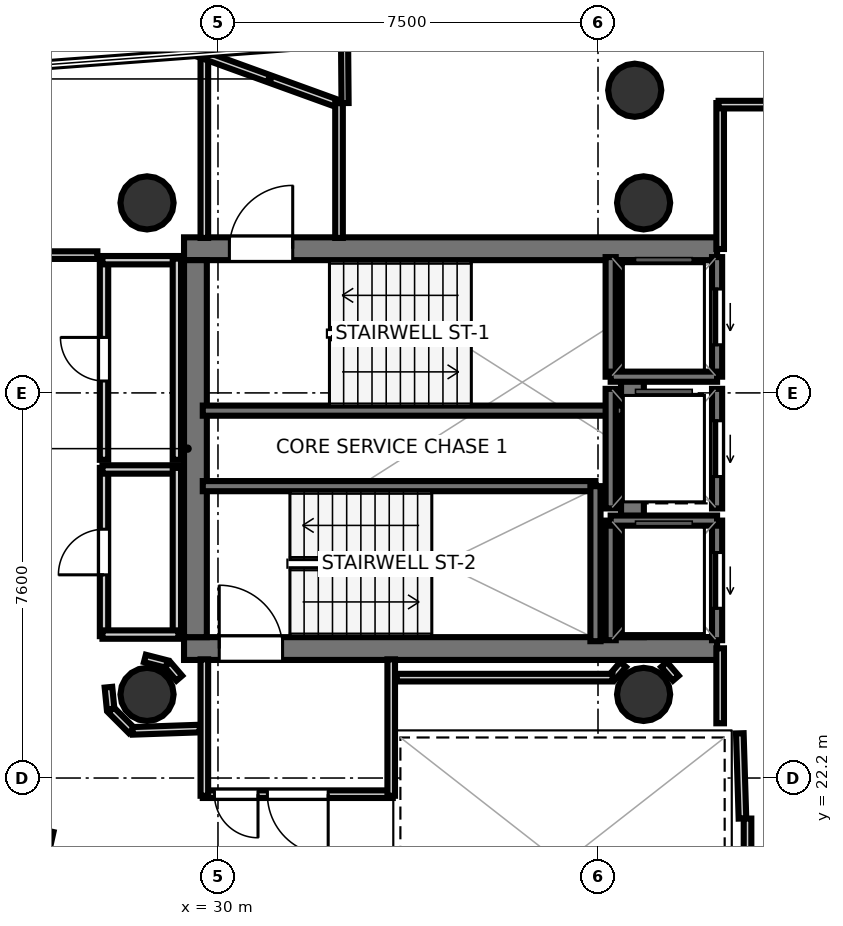
"""IFC4 building model, lengths in metres.
Left out: names, types, materials, properties, quantities, classifications, styles, units other than length and angle.
Written with IfcOpenShell. Run it as: python <this file> out.ifc"""

import sys

from ifc_helpers import new_model, si_unit, direction, frame, frame_2d, origin, origin_2d, place, context, subcontext, project, spatial, rectangle, hollow_circle, extrude, element, fill, save


model = new_model("IFC4")
c1 = context("Model", 3, precision=1e-05, world=origin(), true_north=direction((0.0, 1.0)))
c2 = subcontext(c1, "Body", "Model", "MODEL_VIEW")
j1 = project(units=[si_unit("LENGTHUNIT", "METRE"), si_unit("PLANEANGLEUNIT", "RADIAN")], contexts=[c1])
p1 = place(None, origin())
s1 = spatial("IfcSite", under=j1, at=p1, CompositionType="ELEMENT")
p2 = place(p1, origin())
s2 = spatial("IfcBuilding", under=s1, at=p2, CompositionType="ELEMENT")
p3 = place(p2, frame((0.0, 0.0, 268.6)))
s3 = spatial("IfcBuildingStorey", under=s2, at=p3, CompositionType="ELEMENT", Elevation=268.6)
p4 = place(p3, frame((29.33, 32.645, 0.0), z_axis=(0.0, 0.0, 1.0), x_axis=(1.0, 0.0, 0.0)))
e1 = element("IfcWall", 1, at=p4, inside=s3, PredefinedType="SHEAR", context=c2, shape_type="SweptSolid", body=[
    extrude(rectangle(XDim=10.52, YDim=0.45, at=frame_2d((5.26, 0.0))), origin(), (0.0, 0.0, 1.0), 3.52),
])
p5 = place(p4, frame((0.895, 0.0, 0.0)))
e2 = element("IfcOpeningElement", 2, at=p5, cuts=e1, PredefinedType="OPENING", context=c2, shape_type="SweptSolid", body=[
    extrude(rectangle(XDim=1.25, YDim=2.15, at=frame_2d((0.625, 1.075))), frame((0.0, 0.235, 0.0), z_axis=(0.0, -1.0, 0.0), x_axis=(1.0, 0.0, 0.0)), (0.0, 0.0, 1.0), 0.47),
])
p6 = place(p3, frame((29.33, 24.755, 0.0), z_axis=(0.0, 0.0, 1.0), x_axis=(1.0, 0.0, 0.0)))
e3 = element("IfcWall", 3, at=p6, inside=s3, PredefinedType="SHEAR", context=c2, shape_type="SweptSolid", body=[
    extrude(rectangle(XDim=10.52, YDim=0.45, at=frame_2d((5.26, 0.0))), origin(), (0.0, 0.0, 1.0), 3.52),
])
p7 = place(p6, frame((0.695, 0.0, 0.0)))
e4 = element("IfcOpeningElement", 4, at=p7, cuts=e3, PredefinedType="OPENING", context=c2, shape_type="SweptSolid", body=[
    extrude(rectangle(XDim=1.25, YDim=2.15, at=frame_2d((0.625, 1.075))), frame((0.0, 0.235, 0.0), z_axis=(0.0, -1.0, 0.0), x_axis=(1.0, 0.0, 0.0)), (0.0, 0.0, 1.0), 0.47),
])
for number, where, z_axis, x_axis in (
    (5, (29.555, 24.98, 0.0), (0.0, 0.0, 1.0), (0.0, 1.0, 0.0)),
    (6, (38.18, 24.98, 0.0), (0.0, 0.0, 1.0), (0.0, 1.0, 0.0)),
):
    element("IfcWall", number, at=place(p3, frame(where, z_axis=z_axis, x_axis=x_axis)), inside=s3, PredefinedType="SHEAR", context=c2, shape_type="SweptSolid", body=[
        extrude(rectangle(XDim=7.44, YDim=0.45, at=frame_2d((3.72, 0.0))), origin(), (0.0, 0.0, 1.0), 3.52),
    ])
for number, where, z_axis, x_axis in (
    (7, (28.6, 33.55, 0.0), (0.0, 0.0, 1.0), (1.0, 0.0, 0.0)),
    (8, (28.6, 23.85, 0.0), (0.0, 0.0, 1.0), (1.0, 0.0, 0.0)),
    (9, (38.4, 33.55, 0.0), (0.0, 0.0, 1.0), (1.0, 0.0, 0.0)),
    (10, (38.4, 23.85, 0.0), (0.0, 0.0, 1.0), (1.0, 0.0, 0.0)),
    (11, (38.225, 35.773, 0.0), (0.0, 0.0, 1.0), (1.0, 0.0, 0.0)),
):
    element("IfcColumn", number, at=place(p3, frame(where, z_axis=z_axis, x_axis=x_axis)), inside=s3, PredefinedType="COLUMN", context=c2, shape_type="SweptSolid", body=[
        extrude(hollow_circle(Radius=0.525, WallThickness=0.028, at=origin_2d()), origin(), (0.0, 0.0, 1.0), 3.7),
    ])
p8 = place(p3, frame((29.7, 29.45, 0.0), z_axis=(0.0, 0.0, 1.0), x_axis=(1.0, 0.0, 0.0)))
e12 = element("IfcWall", 12, at=p8, inside=s3, PredefinedType="SOLIDWALL", context=c2, shape_type="SweptSolid", body=[
    extrude(rectangle(XDim=8.3, YDim=0.2, at=frame_2d((4.15, 0.0))), origin(), (0.0, 0.0, 1.0), 3.52),
])
p9 = place(p3, frame((29.7, 27.96, 0.0), z_axis=(0.0, 0.0, 1.0), x_axis=(1.0, 0.0, 0.0)))
e13 = element("IfcWall", 13, at=p9, inside=s3, PredefinedType="SOLIDWALL", context=c2, shape_type="SweptSolid", body=[
    extrude(rectangle(XDim=7.75, YDim=0.2, at=frame_2d((3.875, 0.0))), origin(), (0.0, 0.0, 1.0), 3.52),
])
p10 = place(p3, frame((37.45, 24.9, 0.0), z_axis=(0.0, 0.0, 1.0), x_axis=(0.0, 1.0, 0.0)))
e14 = element("IfcWall", 14, at=p10, inside=s3, PredefinedType="SOLIDWALL", context=c2, shape_type="SweptSolid", body=[
    extrude(rectangle(XDim=3.06, YDim=0.2, at=frame_2d((1.53, 0.0))), origin(), (0.0, 0.0, 1.0), 3.52),
])
p11 = place(p3, frame((39.85, 30.12, 0.0), z_axis=(0.0, 0.0, 1.0), x_axis=(0.0, 1.0, 0.0)))
e15 = element("IfcWall", 15, at=p11, inside=s3, PredefinedType="SOLIDWALL", context=c2, shape_type="SweptSolid", body=[
    extrude(rectangle(XDim=2.36, YDim=0.2, at=frame_2d((1.18, 0.0))), origin(), (0.0, 0.0, 1.0), 3.52),
])
p12 = place(p11, frame((0.63, 0.0, 0.0)))
e16 = element("IfcOpeningElement", 16, at=p12, cuts=e15, PredefinedType="OPENING", context=c2, shape_type="SweptSolid", body=[
    extrude(rectangle(XDim=1.1, YDim=2.15, at=frame_2d((0.55, 1.075))), frame((0.0, 0.11, 0.0), z_axis=(0.0, -1.0, 0.0), x_axis=(1.0, 0.0, 0.0)), (0.0, 0.0, 1.0), 0.22),
])
p13 = place(p3, frame((37.75, 30.12, 0.0), z_axis=(0.0, 0.0, 1.0), x_axis=(0.0, 1.0, 0.0)))
e17 = element("IfcWall", 17, at=p13, inside=s3, PredefinedType="SOLIDWALL", context=c2, shape_type="SweptSolid", body=[
    extrude(rectangle(XDim=2.36, YDim=0.2, at=frame_2d((1.18, 0.0))), origin(), (0.0, 0.0, 1.0), 3.52),
])
p14 = place(p3, frame((37.75, 30.12, 0.0), z_axis=(0.0, 0.0, 1.0), x_axis=(1.0, 0.0, 0.0)))
e18 = element("IfcWall", 18, at=p14, inside=s3, PredefinedType="SOLIDWALL", context=c2, shape_type="SweptSolid", body=[
    extrude(rectangle(XDim=2.1, YDim=0.2, at=frame_2d((1.05, 0.0))), origin(), (0.0, 0.0, 1.0), 3.52),
])
p15 = place(p3, frame((39.85, 24.92, 0.0), z_axis=(0.0, 0.0, 1.0), x_axis=(0.0, 1.0, 0.0)))
e19 = element("IfcWall", 19, at=p15, inside=s3, PredefinedType="SOLIDWALL", context=c2, shape_type="SweptSolid", body=[
    extrude(rectangle(XDim=2.36, YDim=0.2, at=frame_2d((1.18, 0.0))), origin(), (0.0, 0.0, 1.0), 3.52),
])
p16 = place(p15, frame((0.63, 0.0, 0.0)))
e20 = element("IfcOpeningElement", 20, at=p16, cuts=e19, PredefinedType="OPENING", context=c2, shape_type="SweptSolid", body=[
    extrude(rectangle(XDim=1.1, YDim=2.15, at=frame_2d((0.55, 1.075))), frame((0.0, 0.11, 0.0), z_axis=(0.0, -1.0, 0.0), x_axis=(1.0, 0.0, 0.0)), (0.0, 0.0, 1.0), 0.22),
])
p17 = place(p3, frame((37.75, 24.92, 0.0), z_axis=(0.0, 0.0, 1.0), x_axis=(0.0, 1.0, 0.0)))
e21 = element("IfcWall", 21, at=p17, inside=s3, PredefinedType="SOLIDWALL", context=c2, shape_type="SweptSolid", body=[
    extrude(rectangle(XDim=2.36, YDim=0.2, at=frame_2d((1.18, 0.0))), origin(), (0.0, 0.0, 1.0), 3.52),
])
p18 = place(p3, frame((37.75, 27.28, 0.0), z_axis=(0.0, 0.0, 1.0), x_axis=(1.0, 0.0, 0.0)))
e22 = element("IfcWall", 22, at=p18, inside=s3, PredefinedType="SOLIDWALL", context=c2, shape_type="SweptSolid", body=[
    extrude(rectangle(XDim=2.1, YDim=0.2, at=frame_2d((1.05, 0.0))), origin(), (0.0, 0.0, 1.0), 3.52),
])
p19 = place(p3, frame((39.85, 27.52, 0.0), z_axis=(0.0, 0.0, 1.0), x_axis=(0.0, 1.0, 0.0)))
e23 = element("IfcWall", 23, at=p19, inside=s3, PredefinedType="SOLIDWALL", context=c2, shape_type="SweptSolid", body=[
    extrude(rectangle(XDim=2.36, YDim=0.2, at=frame_2d((1.18, 0.0))), origin(), (0.0, 0.0, 1.0), 3.52),
])
p20 = place(p19, frame((0.63, 0.0, 0.0)))
e24 = element("IfcOpeningElement", 24, at=p20, cuts=e23, PredefinedType="OPENING", context=c2, shape_type="SweptSolid", body=[
    extrude(rectangle(XDim=1.1, YDim=2.15, at=frame_2d((0.55, 1.075))), frame((0.0, 0.11, 0.0), z_axis=(0.0, -1.0, 0.0), x_axis=(1.0, 0.0, 0.0)), (0.0, 0.0, 1.0), 0.22),
])
p21 = place(p3, frame((37.75, 27.52, 0.0), z_axis=(0.0, 0.0, 1.0), x_axis=(0.0, 1.0, 0.0)))
e25 = element("IfcWall", 25, at=p21, inside=s3, PredefinedType="SOLIDWALL", context=c2, shape_type="SweptSolid", body=[
    extrude(rectangle(XDim=2.36, YDim=0.2, at=frame_2d((1.18, 0.0))), origin(), (0.0, 0.0, 1.0), 3.52),
])
p22 = place(p3, frame((29.731, 32.858, 0.0), z_axis=(0.0, 0.0, 1.0), x_axis=(0.0, 1.0, 0.0)))
e26 = element("IfcWall", 26, at=p22, inside=s3, PredefinedType="PARTITIONING", context=c2, shape_type="SweptSolid", body=[
    extrude(rectangle(XDim=3.673, YDim=0.15, at=frame_2d((1.836, 0.0))), origin(), (0.0, 0.0, 1.0), 2.84),
])
p23 = place(p3, frame((29.624, 36.502, 0.0), z_axis=(0.0, 0.0, 1.0), x_axis=(0.940145270822, -0.340773927627, 0.0)))
e27 = element("IfcWall", 27, at=p23, inside=s3, PredefinedType="PARTITIONING", context=c2, shape_type="SweptSolid", body=[
    extrude(rectangle(XDim=2.974, YDim=0.15, at=frame_2d((1.487, 0.0))), origin(), (0.0, 0.0, 1.0), 2.84),
])
p24 = place(p3, frame((32.389, 35.52, 0.0), z_axis=(0.0, 0.0, 1.0), x_axis=(0.0, -1.0, 0.0)))
e28 = element("IfcWall", 28, at=p24, inside=s3, PredefinedType="PARTITIONING", context=c2, shape_type="SweptSolid", body=[
    extrude(rectangle(XDim=2.662, YDim=0.15, at=frame_2d((1.331, 0.0))), origin(), (0.0, 0.0, 1.0), 2.84),
])
p25 = place(p3, frame((33.45, 21.881, 0.0), z_axis=(0.0, 0.0, 1.0), x_axis=(-1.0, 0.0, 0.0)))
e29 = element("IfcWall", 29, at=p25, inside=s3, PredefinedType="PARTITIONING", context=c2, shape_type="SweptSolid", body=[
    extrude(rectangle(XDim=3.75, YDim=0.15, at=frame_2d((1.875, 0.0))), origin(), (0.0, 0.0, 1.0), 2.84),
])
p26 = place(p25, frame((1.275, 0.0, 0.0)))
e30 = element("IfcOpeningElement", 30, at=p26, cuts=e29, PredefinedType="OPENING", context=c2, shape_type="SweptSolid", body=[
    extrude(rectangle(XDim=1.2, YDim=2.15, at=frame_2d((0.6, 1.075))), frame((0.0, 0.085, 0.0), z_axis=(0.0, -1.0, 0.0), x_axis=(1.0, 0.0, 0.0)), (0.0, 0.0, 1.0), 0.17),
])
p27 = place(p25, frame((2.66, 0.0, 0.0)))
e31 = element("IfcOpeningElement", 31, at=p27, cuts=e29, PredefinedType="OPENING", context=c2, shape_type="SweptSolid", body=[
    extrude(rectangle(XDim=0.86, YDim=2.05, at=frame_2d((0.43, 1.025))), frame((0.0, 0.085, 0.0), z_axis=(0.0, -1.0, 0.0), x_axis=(1.0, 0.0, 0.0)), (0.0, 0.0, 1.0), 0.17),
])
for number, where, z_axis, x_axis in (
    (32, (29.731, 21.85, 0.0), (0.0, 0.0, 1.0), (0.0, 1.0, 0.0)),
    (33, (33.419, 24.542, 0.0), (0.0, 0.0, 1.0), (0.0, -1.0, 0.0)),
):
    element("IfcWall", number, at=place(p3, frame(where, z_axis=z_axis, x_axis=x_axis)), inside=s3, PredefinedType="PARTITIONING", context=c2, shape_type="SweptSolid", body=[
        extrude(rectangle(XDim=2.692, YDim=0.15, at=frame_2d((1.346, 0.0))), origin(), (0.0, 0.0, 1.0), 2.84),
    ])
p28 = place(p3, frame((40.351, 21.401, 0.0), z_axis=(0.0, 0.0, 1.0), x_axis=(-0.031058045979, 0.999517582527, 0.0)))
e34 = element("IfcWall", 34, at=p28, inside=s3, PredefinedType="PARTITIONING", context=c2, shape_type="SweptSolid", body=[
    extrude(rectangle(XDim=1.682, YDim=0.15, at=frame_2d((0.841, 0.0))), origin(), (0.0, 0.0, 1.0), 2.84),
])
p29 = place(p3, frame((39.911, 23.28, 0.0), z_axis=(0.0, 0.0, 1.0), x_axis=(0.0, 1.0, 0.0)))
e35 = element("IfcWall", 35, at=p29, inside=s3, PredefinedType="PARTITIONING", context=c2, shape_type="SweptSolid", body=[
    extrude(rectangle(XDim=1.48, YDim=0.15, at=frame_2d((0.74, 0.0))), origin(), (0.0, 0.0, 1.0), 2.84),
])
p30 = place(p3, frame((39.911, 32.64, 0.0), z_axis=(0.0, 0.0, 1.0), x_axis=(0.0, 1.0, 0.0)))
e36 = element("IfcWall", 36, at=p30, inside=s3, PredefinedType="PARTITIONING", context=c2, shape_type="SweptSolid", body=[
    extrude(rectangle(XDim=2.88, YDim=0.15, at=frame_2d((1.44, 0.0))), origin(), (0.0, 0.0, 1.0), 2.84),
])
p31 = place(p3, frame((39.88, 35.489, 0.0), z_axis=(0.0, 0.0, 1.0), x_axis=(1.0, 0.0, 0.0)))
e37 = element("IfcWall", 37, at=p31, inside=s3, PredefinedType="PARTITIONING", context=c2, shape_type="SweptSolid", body=[
    extrude(rectangle(XDim=1.48, YDim=0.15, at=frame_2d((0.74, 0.0))), origin(), (0.0, 0.0, 1.0), 2.84),
])
p32 = place(p3, frame((40.451, 18.08, 0.0), z_axis=(0.0, 0.0, 1.0), x_axis=(0.0, 1.0, 0.0)))
e38 = element("IfcWall", 38, at=p32, inside=s3, PredefinedType="PARTITIONING", context=c2, shape_type="SweptSolid", body=[
    extrude(rectangle(XDim=3.32, YDim=0.15, at=frame_2d((1.66, 0.0))), origin(), (0.0, 0.0, 1.0), 2.84),
])
p33 = place(p3, frame((27.751, 25.0, 0.0), z_axis=(0.0, 0.0, 1.0), x_axis=(0.0, 1.0, 0.0)))
e39 = element("IfcWall", 39, at=p33, inside=s3, PredefinedType="PLUMBINGWALL", context=c2, shape_type="SweptSolid", body=[
    extrude(rectangle(XDim=3.32, YDim=0.165, at=frame_2d((1.66, 0.0))), origin(), (0.0, 0.0, 1.0), 2.84),
])
p34 = place(p33, frame((1.21, 0.0, 0.0)))
e40 = element("IfcOpeningElement", 40, at=p34, cuts=e39, PredefinedType="OPENING", context=c2, shape_type="SweptSolid", body=[
    extrude(rectangle(XDim=0.9, YDim=2.1, at=frame_2d((0.45, 1.05))), frame((0.0, 0.093, 0.0), z_axis=(0.0, -1.0, 0.0), x_axis=(1.0, 0.0, 0.0)), (0.0, 0.0, 1.0), 0.185),
])
p35 = place(p3, frame((27.72, 28.289, 0.0), z_axis=(0.0, 0.0, 1.0), x_axis=(1.0, 0.0, 0.0)))
e41 = element("IfcWall", 41, at=p35, inside=s3, PredefinedType="PLUMBINGWALL", context=c2, shape_type="SweptSolid", body=[
    extrude(rectangle(XDim=1.5, YDim=0.165, at=frame_2d((0.75, 0.0))), origin(), (0.0, 0.0, 1.0), 2.84),
])
p36 = place(p3, frame((29.189, 28.32, 0.0), z_axis=(0.0, 0.0, 1.0), x_axis=(0.0, -1.0, 0.0)))
e42 = element("IfcWall", 42, at=p36, inside=s3, PredefinedType="PLUMBINGWALL", context=c2, shape_type="SweptSolid", body=[
    extrude(rectangle(XDim=3.32, YDim=0.165, at=frame_2d((1.66, 0.0))), origin(), (0.0, 0.0, 1.0), 2.84),
])
p37 = place(p3, frame((29.22, 25.031, 0.0), z_axis=(0.0, 0.0, 1.0), x_axis=(-1.0, 0.0, 0.0)))
e43 = element("IfcWall", 43, at=p37, inside=s3, PredefinedType="PLUMBINGWALL", context=c2, shape_type="SweptSolid", body=[
    extrude(rectangle(XDim=1.5, YDim=0.165, at=frame_2d((0.75, 0.0))), origin(), (0.0, 0.0, 1.0), 2.84),
])
p38 = place(p3, frame((27.751, 28.48, 0.0), z_axis=(0.0, 0.0, 1.0), x_axis=(0.0, 1.0, 0.0)))
e44 = element("IfcWall", 44, at=p38, inside=s3, PredefinedType="PLUMBINGWALL", context=c2, shape_type="SweptSolid", body=[
    extrude(rectangle(XDim=3.97, YDim=0.165, at=frame_2d((1.985, 0.0))), origin(), (0.0, 0.0, 1.0), 2.84),
])
p39 = place(p38, frame((1.555, 0.0, 0.0)))
e45 = element("IfcOpeningElement", 45, at=p39, cuts=e44, PredefinedType="OPENING", context=c2, shape_type="SweptSolid", body=[
    extrude(rectangle(XDim=0.86, YDim=2.05, at=frame_2d((0.43, 1.025))), frame((0.0, 0.093, 0.0), z_axis=(0.0, -1.0, 0.0), x_axis=(1.0, 0.0, 0.0)), (0.0, 0.0, 1.0), 0.185),
])
p40 = place(p3, frame((27.72, 32.419, 0.0), z_axis=(0.0, 0.0, 1.0), x_axis=(1.0, 0.0, 0.0)))
e46 = element("IfcWall", 46, at=p40, inside=s3, PredefinedType="PLUMBINGWALL", context=c2, shape_type="SweptSolid", body=[
    extrude(rectangle(XDim=1.5, YDim=0.165, at=frame_2d((0.75, 0.0))), origin(), (0.0, 0.0, 1.0), 2.84),
])
p41 = place(p3, frame((29.189, 32.45, 0.0), z_axis=(0.0, 0.0, 1.0), x_axis=(0.0, -1.0, 0.0)))
e47 = element("IfcWall", 47, at=p41, inside=s3, PredefinedType="PLUMBINGWALL", context=c2, shape_type="SweptSolid", body=[
    extrude(rectangle(XDim=3.97, YDim=0.165, at=frame_2d((1.985, 0.0))), origin(), (0.0, 0.0, 1.0), 2.84),
])
p42 = place(p3, frame((29.236, 24.17, 0.0), z_axis=(0.0, 0.0, 1.0), x_axis=(-0.652260263346, 0.757995084984, 0.0)))
e48 = element("IfcWall", 48, at=p42, inside=s3, PredefinedType="PARTITIONING", context=c2, shape_type="SweptSolid", body=[
    extrude(rectangle(XDim=0.355, YDim=0.15, at=frame_2d((0.178, 0.0))), origin(), (0.0, 0.0, 1.0), 2.84),
])
p43 = place(p3, frame((28.988, 24.45, 0.0), z_axis=(0.0, 0.0, 1.0), x_axis=(-0.968704505916, 0.248216800836, 0.0)))
e49 = element("IfcWall", 49, at=p43, inside=s3, PredefinedType="PARTITIONING", context=c2, shape_type="SweptSolid", body=[
    extrude(rectangle(XDim=0.445, YDim=0.15, at=frame_2d((0.222, 0.0))), origin(), (0.0, 0.0, 1.0), 2.84),
])
p44 = place(p3, frame((39.036, 24.17, 0.0), z_axis=(0.0, 0.0, 1.0), x_axis=(-0.652260263346, 0.757995084984, 0.0)))
e50 = element("IfcWall", 50, at=p44, inside=s3, PredefinedType="PARTITIONING", context=c2, shape_type="SweptSolid", body=[
    extrude(rectangle(XDim=0.355, YDim=0.15, at=frame_2d((0.178, 0.0))), origin(), (0.0, 0.0, 1.0), 2.84),
])
p45 = place(p3, frame((37.996, 24.44, 0.0), z_axis=(0.0, 0.0, 1.0), x_axis=(-0.652425645794, -0.757852740782, 0.0)))
e51 = element("IfcWall", 51, at=p45, inside=s3, PredefinedType="PARTITIONING", context=c2, shape_type="SweptSolid", body=[
    extrude(rectangle(XDim=0.32, YDim=0.15, at=frame_2d((0.16, 0.0))), origin(), (0.0, 0.0, 1.0), 2.84),
])
p46 = place(p3, frame((37.787, 24.181, 0.0), z_axis=(0.0, 0.0, 1.0), x_axis=(-1.0, 0.0, 0.0)))
e52 = element("IfcWall", 52, at=p46, inside=s3, PredefinedType="PARTITIONING", context=c2, shape_type="SweptSolid", body=[
    extrude(rectangle(XDim=4.257, YDim=0.15, at=frame_2d((2.129, 0.0))), origin(), (0.0, 0.0, 1.0), 2.84),
])
p47 = place(p3, frame((27.838, 23.992, 0.0), z_axis=(0.0, 0.0, 1.0), x_axis=(0.098273407977, -0.995159453196, 0.0)))
e53 = element("IfcWall", 53, at=p47, inside=s3, PredefinedType="PARTITIONING", context=c2, shape_type="SweptSolid", body=[
    extrude(rectangle(XDim=0.432, YDim=0.15, at=frame_2d((0.216, 0.0))), origin(), (0.0, 0.0, 1.0), 2.84),
])
p48 = place(p3, frame((27.89, 23.543, 0.0), z_axis=(0.0, 0.0, 1.0), x_axis=(0.707106781187, -0.707106781187, 0.0)))
e54 = element("IfcWall", 54, at=p48, inside=s3, PredefinedType="PARTITIONING", context=c2, shape_type="SweptSolid", body=[
    extrude(rectangle(XDim=0.57, YDim=0.15, at=frame_2d((0.285, 0.0))), origin(), (0.0, 0.0, 1.0), 2.84),
])
p49 = place(p3, frame((28.316, 23.131, 0.0), z_axis=(0.0, 0.0, 1.0), x_axis=(0.999405342193, 0.034481328227, 0.0)))
e55 = element("IfcWall", 55, at=p49, inside=s3, PredefinedType="PARTITIONING", context=c2, shape_type="SweptSolid", body=[
    extrude(rectangle(XDim=1.324, YDim=0.15, at=frame_2d((0.662, 0.0))), origin(), (0.0, 0.0, 1.0), 2.84),
])
p50 = place(p3, frame((25.87, 17.507, 0.0), z_axis=(0.0, 0.0, 1.0), x_axis=(0.21736677809, 0.976089997789, 0.0)))
e56 = element("IfcWall", 56, at=p50, inside=s3, PredefinedType="PARTITIONING", context=c2, shape_type="SweptSolid", body=[
    extrude(rectangle(XDim=3.732, YDim=0.15, at=frame_2d((1.866, 0.0))), origin(), (0.0, 0.0, 1.0), 2.84),
])
p51 = place(p3, frame((25.25, 32.519, 0.0), z_axis=(0.0, 0.0, 1.0), x_axis=(1.0, 0.0, 0.0)))
e57 = element("IfcWall", 57, at=p51, inside=s3, PredefinedType="PARTITIONING", context=c2, shape_type="SweptSolid", body=[
    extrude(rectangle(XDim=2.37, YDim=0.15, at=frame_2d((1.185, 0.0))), origin(), (0.0, 0.0, 1.0), 2.84),
])
p52 = place(p3, frame((32.508, 35.52, 0.0), z_axis=(0.0, 0.0, 1.0), x_axis=(-0.008018988351, 0.999967847396, 0.0)))
e58 = element("IfcWall", 58, at=p52, inside=s3, PredefinedType="PARTITIONING", context=c2, shape_type="SweptSolid", body=[
    extrude(rectangle(XDim=1.218, YDim=0.14, at=frame_2d((0.609, 0.0))), origin(), (0.0, 0.0, 1.0), 2.84),
])
p53 = place(p5, origin())
e59 = element("IfcDoor", 59, at=p53, inside=s3, OperationType="SINGLE_SWING_RIGHT", PredefinedType="DOOR", context=c2, shape_type="SweptSolid", body=[
    extrude(rectangle(XDim=1.25, YDim=2.15, at=frame_2d((0.625, 1.075))), frame((0.0, 0.025, 0.0), z_axis=(0.0, -1.0, 0.0), x_axis=(1.0, 0.0, 0.0)), (0.0, 0.0, 1.0), 0.05),
])
fill(e2, e59)
p54 = place(p7, origin())
e60 = element("IfcDoor", 60, at=p54, inside=s3, OperationType="SINGLE_SWING_LEFT", PredefinedType="DOOR", context=c2, shape_type="SweptSolid", body=[
    extrude(rectangle(XDim=1.25, YDim=2.15, at=frame_2d((0.625, 1.075))), frame((0.0, 0.025, 0.0), z_axis=(0.0, -1.0, 0.0), x_axis=(1.0, 0.0, 0.0)), (0.0, 0.0, 1.0), 0.05),
])
fill(e4, e60)
p55 = place(p12, origin())
e61 = element("IfcDoor", 61, at=p55, inside=s3, OperationType="SLIDING_TO_LEFT", PredefinedType="DOOR", context=c2, shape_type="SweptSolid", body=[
    extrude(rectangle(XDim=1.1, YDim=2.15, at=frame_2d((0.55, 1.075))), frame((0.0, 0.025, 0.0), z_axis=(0.0, -1.0, 0.0), x_axis=(1.0, 0.0, 0.0)), (0.0, 0.0, 1.0), 0.05),
])
fill(e16, e61)
p56 = place(p16, origin())
e62 = element("IfcDoor", 62, at=p56, inside=s3, OperationType="SLIDING_TO_LEFT", PredefinedType="DOOR", context=c2, shape_type="SweptSolid", body=[
    extrude(rectangle(XDim=1.1, YDim=2.15, at=frame_2d((0.55, 1.075))), frame((0.0, 0.025, 0.0), z_axis=(0.0, -1.0, 0.0), x_axis=(1.0, 0.0, 0.0)), (0.0, 0.0, 1.0), 0.05),
])
fill(e20, e62)
p57 = place(p20, origin())
e63 = element("IfcDoor", 63, at=p57, inside=s3, OperationType="SLIDING_TO_LEFT", PredefinedType="DOOR", context=c2, shape_type="SweptSolid", body=[
    extrude(rectangle(XDim=1.1, YDim=2.15, at=frame_2d((0.55, 1.075))), frame((0.0, 0.025, 0.0), z_axis=(0.0, -1.0, 0.0), x_axis=(1.0, 0.0, 0.0)), (0.0, 0.0, 1.0), 0.05),
])
fill(e24, e63)
p58 = place(p26, origin())
e64 = element("IfcDoor", 64, at=p58, inside=s3, OperationType="SINGLE_SWING_LEFT", PredefinedType="DOOR", context=c2, shape_type="SweptSolid", body=[
    extrude(rectangle(XDim=1.2, YDim=2.15, at=frame_2d((0.6, 1.075))), frame((0.0, 0.025, 0.0), z_axis=(0.0, -1.0, 0.0), x_axis=(1.0, 0.0, 0.0)), (0.0, 0.0, 1.0), 0.05),
])
fill(e30, e64)
p59 = place(p34, origin())
e65 = element("IfcDoor", 65, at=p59, inside=s3, OperationType="SINGLE_SWING_LEFT", PredefinedType="DOOR", context=c2, shape_type="SweptSolid", body=[
    extrude(rectangle(XDim=0.9, YDim=2.1, at=frame_2d((0.45, 1.05))), frame((0.0, 0.025, 0.0), z_axis=(0.0, -1.0, 0.0), x_axis=(1.0, 0.0, 0.0)), (0.0, 0.0, 1.0), 0.05),
])
fill(e40, e65)
p60 = place(p39, origin())
e66 = element("IfcDoor", 66, at=p60, inside=s3, OperationType="SINGLE_SWING_RIGHT", PredefinedType="DOOR", context=c2, shape_type="SweptSolid", body=[
    extrude(rectangle(XDim=0.86, YDim=2.05, at=frame_2d((0.43, 1.025))), frame((0.0, 0.025, 0.0), z_axis=(0.0, -1.0, 0.0), x_axis=(1.0, 0.0, 0.0)), (0.0, 0.0, 1.0), 0.05),
])
fill(e45, e66)
p61 = place(p27, origin())
e67 = element("IfcDoor", 67, at=p61, inside=s3, OperationType="SINGLE_SWING_LEFT", PredefinedType="DOOR", context=c2, shape_type="SweptSolid", body=[
    extrude(rectangle(XDim=0.86, YDim=2.05, at=frame_2d((0.43, 1.025))), frame((0.0, 0.025, 0.0), z_axis=(0.0, -1.0, 0.0), x_axis=(1.0, 0.0, 0.0)), (0.0, 0.0, 1.0), 0.05),
])
fill(e31, e67)
save(model, sys.argv[1])
